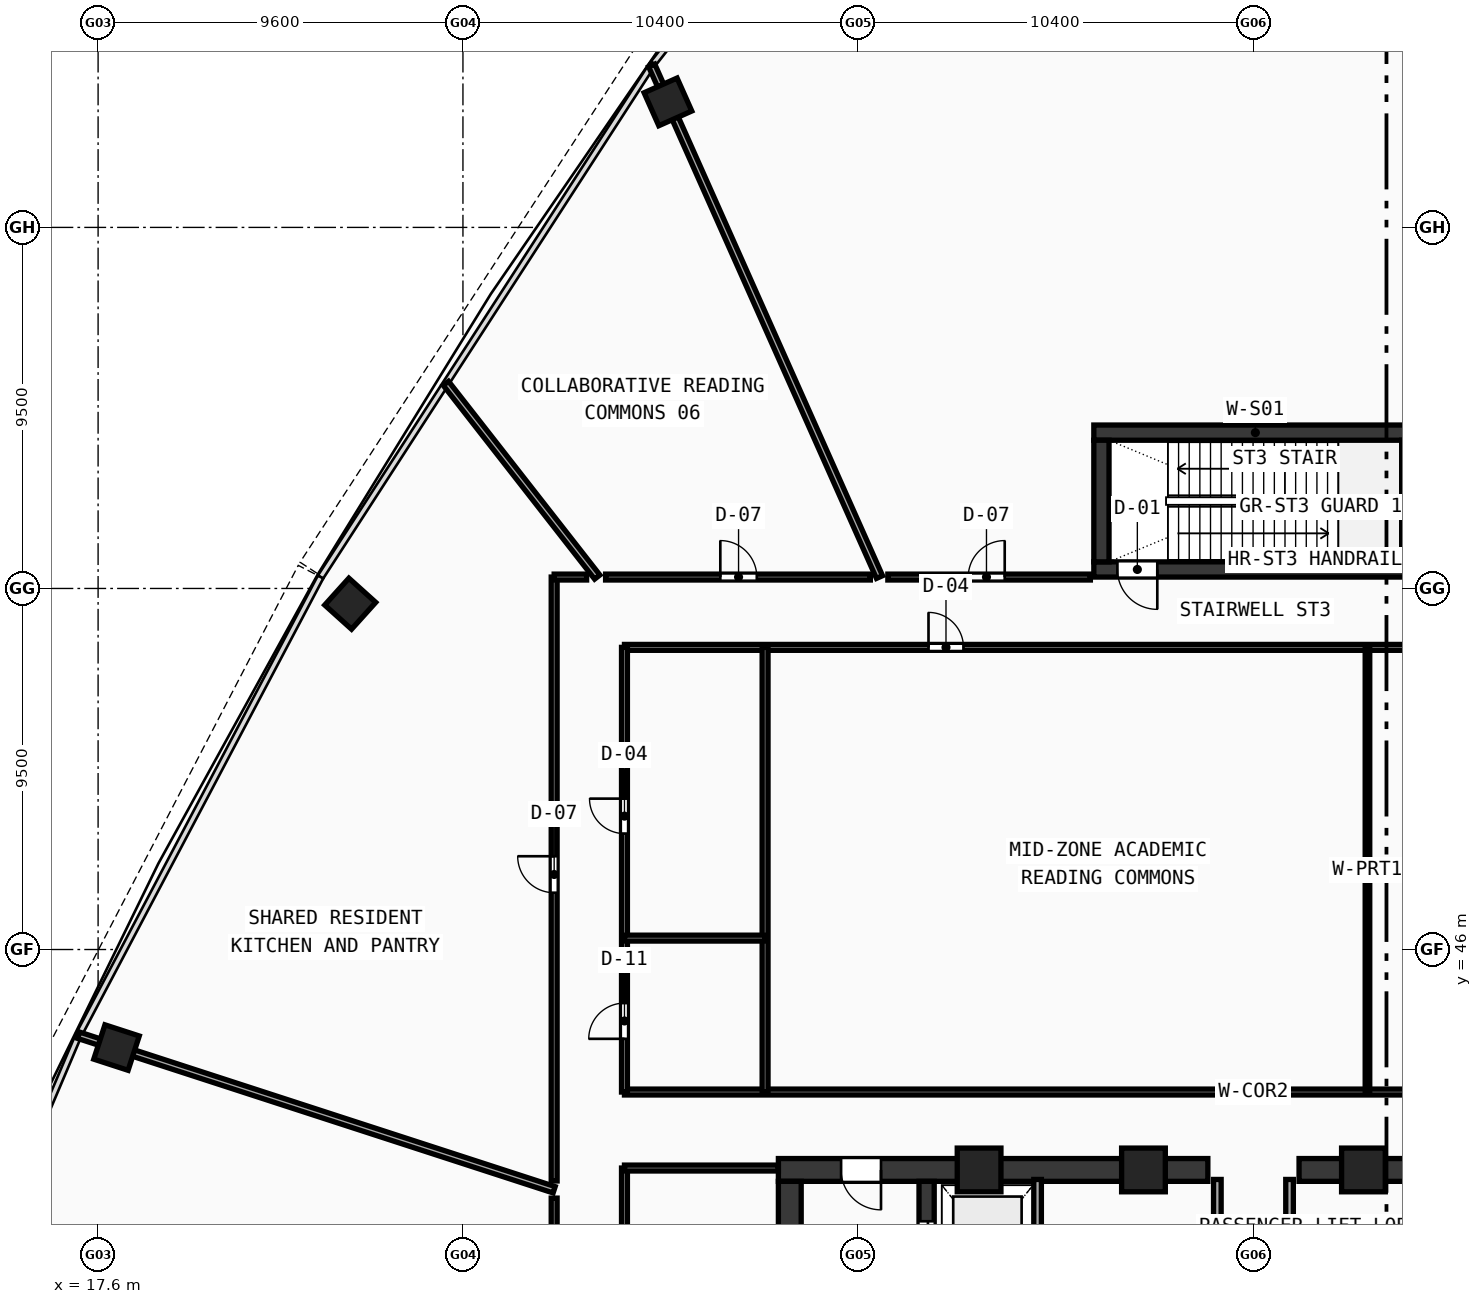
"""IFC4 building model, lengths in metres.
Left out: names, types, materials, properties, quantities, classifications, styles, units other than length and angle.
Written with IfcOpenShell. Run it as: python <this file> out.ifc"""

import sys

from ifc_helpers import new_model, si_unit, direction, frame, frame_2d, origin, origin_with_axes, origin_2d, place, context, subcontext, project, spatial, rectangle, hollow_rectangle, extrude, source, transform, mapped, element, fill, save


model = new_model("IFC4")
c1 = context("Model", 3, precision=1e-05, world=origin(), true_north=direction((0.0, 1.0)))
c2 = subcontext(c1, "Body", "Model", "MODEL_VIEW")
j1 = project(units=[si_unit("LENGTHUNIT", "METRE"), si_unit("PLANEANGLEUNIT", "RADIAN")], contexts=[c1])
p1 = place(None, origin())
s1 = spatial("IfcSite", under=j1, at=p1, CompositionType="ELEMENT")
p2 = place(p1, origin())
s2 = spatial("IfcBuilding", under=s1, at=p2, CompositionType="ELEMENT")
p3 = place(p2, frame((0.0, 0.0, 170.31)))
s3 = spatial("IfcBuildingStorey", under=s2, at=p3, CompositionType="ELEMENT", Elevation=170.31)
p4 = place(p3, frame((35.5, 40.2, 0.0), z_axis=(0.0, 0.0, 1.0), x_axis=(1.0, 0.0, 0.0)))
e1 = element("IfcWall", 1, at=p4, inside=s3, PredefinedType="SHEAR", context=c2, shape_type="SweptSolid", body=[
    extrude(rectangle(XDim=11.3, YDim=0.6, at=frame_2d((5.65, 0.0))), origin(), (0.0, 0.0, 1.0), 5.57),
])
p5 = place(p4, frame((1.65, 0.0, 0.0)))
e2 = element("IfcOpeningElement", 2, at=p5, cuts=e1, PredefinedType="OPENING", context=c2, shape_type="SweptSolid", body=[
    extrude(rectangle(XDim=1.05, YDim=2.1, at=frame_2d((0.525, 1.05))), frame((0.0, 0.31, 0.0), z_axis=(0.0, -1.0, 0.0), x_axis=(1.0, 0.0, 0.0)), (0.0, 0.0, 1.0), 0.62),
])
p6 = place(p3, frame((49.2, 40.2, 0.0), z_axis=(0.0, 0.0, 1.0), x_axis=(1.0, 0.0, 0.0)))
e3 = element("IfcWall", 3, at=p6, inside=s3, PredefinedType="SHEAR", context=c2, shape_type="SweptSolid", body=[
    extrude(rectangle(XDim=11.3, YDim=0.6, at=frame_2d((5.65, 0.0))), origin(), (0.0, 0.0, 1.0), 5.57),
])
p7 = place(p6, frame((8.6, 0.0, 0.0)))
e4 = element("IfcOpeningElement", 4, at=p7, cuts=e3, PredefinedType="OPENING", context=c2, shape_type="SweptSolid", body=[
    extrude(rectangle(XDim=1.05, YDim=2.1, at=frame_2d((0.525, 1.05))), frame((0.0, 0.31, 0.0), z_axis=(0.0, -1.0, 0.0), x_axis=(1.0, 0.0, 0.0)), (0.0, 0.0, 1.0), 0.62),
])
p8 = place(p3, frame((35.8, 27.8, 0.0), z_axis=(0.0, 0.0, 1.0), x_axis=(0.0, 1.0, 0.0)))
e5 = element("IfcWall", 5, at=p8, inside=s3, PredefinedType="SHEAR", context=c2, shape_type="SweptSolid", body=[
    extrude(rectangle(XDim=12.1, YDim=0.6, at=frame_2d((6.05, 0.0))), origin(), (0.0, 0.0, 1.0), 5.57),
])
p9 = place(p3, frame((39.4, 27.8, 0.0), z_axis=(0.0, 0.0, 1.0), x_axis=(0.0, 1.0, 0.0)))
e6 = element("IfcWall", 6, at=p9, inside=s3, PredefinedType="SHEAR", context=c2, shape_type="SweptSolid", body=[
    extrude(rectangle(XDim=12.1, YDim=0.4, at=frame_2d((6.05, 0.0))), origin(), (0.0, 0.0, 1.0), 5.57),
])
p10 = place(p9, frame((9.95, 0.0, 0.0)))
e7 = element("IfcOpeningElement", 7, at=p10, cuts=e6, PredefinedType="OPENING", context=c2, shape_type="SweptSolid", body=[
    extrude(rectangle(XDim=1.1, YDim=2.1, at=frame_2d((0.55, 1.05))), frame((0.0, 0.21, 0.0), z_axis=(0.0, -1.0, 0.0), x_axis=(1.0, 0.0, 0.0)), (0.0, 0.0, 1.0), 0.42),
])
p11 = place(p3, frame((43.8, 59.6, 0.0), z_axis=(0.0, 0.0, 1.0), x_axis=(1.0, 0.0, 0.0)))
e8 = element("IfcWall", 8, at=p11, inside=s3, PredefinedType="SHEAR", context=c2, shape_type="SweptSolid", body=[
    extrude(rectangle(XDim=8.5, YDim=0.4, at=frame_2d((4.25, 0.0))), origin(), (0.0, 0.0, 1.0), 5.57),
])
p12 = place(p3, frame((43.8, 56.0, 0.0), z_axis=(0.0, 0.0, 1.0), x_axis=(1.0, 0.0, 0.0)))
e9 = element("IfcWall", 9, at=p12, inside=s3, PredefinedType="SHEAR", context=c2, shape_type="SweptSolid", body=[
    extrude(rectangle(XDim=8.5, YDim=0.4, at=frame_2d((4.25, 0.0))), origin(), (0.0, 0.0, 1.0), 5.57),
])
p13 = place(p12, frame((0.62, 0.0, 0.0)))
e10 = element("IfcOpeningElement", 10, at=p13, cuts=e9, PredefinedType="OPENING", context=c2, shape_type="SweptSolid", body=[
    extrude(rectangle(XDim=1.05, YDim=2.1, at=frame_2d((0.525, 1.05))), frame((0.0, 0.21, 0.0), z_axis=(0.0, -1.0, 0.0), x_axis=(1.0, 0.0, 0.0)), (0.0, 0.0, 1.0), 0.42),
])
for number, where, z_axis, x_axis in (
    (11, (44.0, 56.2, 0.0), (0.0, 0.0, 1.0), (0.0, 1.0, 0.0)),
    (12, (52.1, 56.2, 0.0), (0.0, 0.0, 1.0), (0.0, 1.0, 0.0)),
):
    element("IfcWall", number, at=place(p3, frame(where, z_axis=z_axis, x_axis=x_axis)), inside=s3, PredefinedType="SHEAR", context=c2, shape_type="SweptSolid", body=[
        extrude(rectangle(XDim=3.2, YDim=0.4, at=frame_2d((1.6, 0.0))), origin(), (0.0, 0.0, 1.0), 5.57),
    ])
m1 = source(origin(), c2, "Body", "SweptSolid", [
    extrude(hollow_rectangle(XDim=1.15, YDim=1.15, WallThickness=0.048, at=origin_2d()), origin(), (0.0, 0.0, 1.0), 5.83),
])
for number, where, z_axis, x_axis in (
    (13, (50.894, 40.2, -0.26), (0.0, 0.0, 1.0), (1.0, 0.0, 0.0)),
    (14, (45.106, 40.2, -0.26), (0.0, 0.0, 1.0), (1.0, 0.0, 0.0)),
    (15, (40.781, 40.2, -0.26), (0.0, 0.0, 1.0), (1.0, 0.0, 0.0)),
):
    element("IfcColumn", number, at=place(p3, frame(where, z_axis=z_axis, x_axis=x_axis)), inside=s3, PredefinedType="COLUMN", context=c2, shape_type="MappedRepresentation", body=[
        mapped(m1, transform((0.0, 0.0, 0.0), scale=1.0)),
    ])
m2 = source(origin(), c2, "Body", "SweptSolid", [
    extrude(hollow_rectangle(XDim=0.95, YDim=0.95, WallThickness=0.04, at=origin_2d()), origin(), (0.0, 0.0, 1.0), 5.83),
])
for number, where, z_axis, x_axis in (
    (16, (32.594, 68.303, -0.26), (0.0, 0.0, 1.0), (-0.914, -0.407, 0.0)),
    (17, (24.234, 55.099, -0.26), (0.0, 0.0, 1.0), (-0.669, -0.743, 0.0)),
    (18, (18.085, 43.42, -0.26), (0.0, 0.0, 1.0), (-0.309, -0.951, 0.0)),
):
    element("IfcColumn", number, at=place(p3, frame(where, z_axis=z_axis, x_axis=x_axis)), inside=s3, PredefinedType="COLUMN", context=c2, shape_type="MappedRepresentation", body=[
        mapped(m2, transform((0.0, 0.0, 0.0), scale=1.0)),
    ])
p14 = place(p3, frame((42.32, 33.5, 0.0), z_axis=(0.0, 0.0, 1.0), x_axis=(0.0, 1.0, 0.0)))
e19 = element("IfcWall", 19, at=p14, inside=s3, PredefinedType="SOLIDWALL", context=c2, shape_type="SweptSolid", body=[
    extrude(rectangle(XDim=6.45, YDim=0.2, at=frame_2d((3.225, 0.0))), origin(), (0.0, 0.0, 1.0), 5.57),
])
p15 = place(p14, frame((1.0, 0.0, 0.0)))
e20 = element("IfcOpeningElement", 20, at=p15, cuts=e19, PredefinedType="OPENING", context=c2, shape_type="SweptSolid", body=[
    extrude(rectangle(XDim=1.05, YDim=2.1, at=frame_2d((0.525, 1.05))), frame((0.0, 0.11, 0.0), z_axis=(0.0, -1.0, 0.0), x_axis=(1.0, 0.0, 0.0)), (0.0, 0.0, 1.0), 0.22),
])
for number, where, z_axis, x_axis in (
    (21, (47.05, 37.32, 0.0), (0.0, 0.0, 1.0), (0.0, 1.0, 0.0)),
    (22, (48.95, 37.32, 0.0), (0.0, 0.0, 1.0), (0.0, 1.0, 0.0)),
):
    element("IfcWall", number, at=place(p3, frame(where, z_axis=z_axis, x_axis=x_axis)), inside=s3, PredefinedType="SOLIDWALL", context=c2, shape_type="SweptSolid", body=[
        extrude(rectangle(XDim=2.63, YDim=0.2, at=frame_2d((1.315, 0.0))), origin(), (0.0, 0.0, 1.0), 5.57),
    ])
p16 = place(p3, frame((31.45, 42.25, 0.0), z_axis=(0.0, 0.0, 1.0), x_axis=(1.0, 0.0, 0.0)))
e23 = element("IfcWall", 23, at=p16, inside=s3, PredefinedType="PARTITIONING", context=c2, shape_type="SweptSolid", body=[
    extrude(rectangle(XDim=33.1, YDim=0.155, at=frame_2d((16.55, 0.0))), origin(), (0.0, 0.0, 1.0), 2.22),
])
p17 = place(p3, frame((31.45, 53.95, 0.0), z_axis=(0.0, 0.0, 1.0), x_axis=(1.0, 0.0, 0.0)))
e24 = element("IfcWall", 24, at=p17, inside=s3, PredefinedType="PARTITIONING", context=c2, shape_type="SweptSolid", body=[
    extrude(rectangle(XDim=33.1, YDim=0.155, at=frame_2d((16.55, 0.0))), origin(), (0.0, 0.0, 1.0), 2.22),
])
p18 = place(p17, frame((8.0, 0.0, 0.0)))
e25 = element("IfcOpeningElement", 25, at=p18, cuts=e24, PredefinedType="OPENING", context=c2, shape_type="SweptSolid", body=[
    extrude(rectangle(XDim=0.92, YDim=2.1, at=frame_2d((0.46, 1.05))), frame((0.0, 0.087, 0.0), z_axis=(0.0, -1.0, 0.0), x_axis=(1.0, 0.0, 0.0)), (0.0, 0.0, 1.0), 0.175),
])
p19 = place(p17, frame((24.05, 0.0, 0.0)))
e26 = element("IfcOpeningElement", 26, at=p19, cuts=e24, PredefinedType="OPENING", context=c2, shape_type="SweptSolid", body=[
    extrude(rectangle(XDim=0.92, YDim=2.1, at=frame_2d((0.46, 1.05))), frame((0.0, 0.087, 0.0), z_axis=(0.0, -1.0, 0.0), x_axis=(1.0, 0.0, 0.0)), (0.0, 0.0, 1.0), 0.175),
])
p20 = place(p3, frame((31.45, 42.25, 0.0), z_axis=(0.0, 0.0, 1.0), x_axis=(0.0, 1.0, 0.0)))
e27 = element("IfcWall", 27, at=p20, inside=s3, PredefinedType="PARTITIONING", context=c2, shape_type="SweptSolid", body=[
    extrude(rectangle(XDim=11.7, YDim=0.155, at=frame_2d((5.85, 0.0))), origin(), (0.0, 0.0, 1.0), 2.22),
])
p21 = place(p20, frame((1.4, 0.0, 0.0)))
e28 = element("IfcOpeningElement", 28, at=p21, cuts=e27, PredefinedType="OPENING", context=c2, shape_type="SweptSolid", body=[
    extrude(rectangle(XDim=0.94, YDim=2.1, at=frame_2d((0.47, 1.05))), frame((0.0, 0.087, 0.0), z_axis=(0.0, -1.0, 0.0), x_axis=(1.0, 0.0, 0.0)), (0.0, 0.0, 1.0), 0.175),
])
p22 = place(p20, frame((6.8, 0.0, 0.0)))
e29 = element("IfcOpeningElement", 29, at=p22, cuts=e27, PredefinedType="OPENING", context=c2, shape_type="SweptSolid", body=[
    extrude(rectangle(XDim=0.92, YDim=2.1, at=frame_2d((0.46, 1.05))), frame((0.0, 0.087, 0.0), z_axis=(0.0, -1.0, 0.0), x_axis=(1.0, 0.0, 0.0)), (0.0, 0.0, 1.0), 0.175),
])
p23 = place(p3, frame((35.15, 42.25, 0.0), z_axis=(0.0, 0.0, 1.0), x_axis=(0.0, 1.0, 0.0)))
e30 = element("IfcWall", 30, at=p23, inside=s3, PredefinedType="PARTITIONING", context=c2, shape_type="SweptSolid", body=[
    extrude(rectangle(XDim=11.7, YDim=0.155, at=frame_2d((5.85, 0.0))), origin(), (0.0, 0.0, 1.0), 2.22),
])
p24 = place(p3, frame((31.45, 46.3, 0.0), z_axis=(0.0, 0.0, 1.0), x_axis=(1.0, 0.0, 0.0)))
e31 = element("IfcWall", 31, at=p24, inside=s3, PredefinedType="PARTITIONING", context=c2, shape_type="SweptSolid", body=[
    extrude(rectangle(XDim=3.7, YDim=0.155, at=frame_2d((1.85, 0.0))), origin(), (0.0, 0.0, 1.0), 2.22),
])
p25 = place(p3, frame((51.0, 42.25, 0.0), z_axis=(0.0, 0.0, 1.0), x_axis=(0.0, 1.0, 0.0)))
e32 = element("IfcWall", 32, at=p25, inside=s3, PredefinedType="PARTITIONING", context=c2, shape_type="SweptSolid", body=[
    extrude(rectangle(XDim=11.7, YDim=0.12, at=frame_2d((5.85, 0.0))), origin(), (0.0, 0.0, 1.0), 5.17),
])
p26 = place(p3, frame((31.45, 23.65, 0.0), z_axis=(0.0, 0.0, 1.0), x_axis=(0.0, 1.0, 0.0)))
e33 = element("IfcWall", 33, at=p26, inside=s3, PredefinedType="PARTITIONING", context=c2, shape_type="SweptSolid", body=[
    extrude(rectangle(XDim=16.6, YDim=0.155, at=frame_2d((8.3, 0.0))), origin(), (0.0, 0.0, 1.0), 2.22),
])
p27 = place(p26, frame((7.5, 0.0, 0.0)))
e34 = element("IfcOpeningElement", 34, at=p27, cuts=e33, PredefinedType="OPENING", context=c2, shape_type="SweptSolid", body=[
    extrude(rectangle(XDim=0.9, YDim=2.08, at=frame_2d((0.45, 1.04))), frame((0.0, 0.087, 0.0), z_axis=(0.0, -1.0, 0.0), x_axis=(1.0, 0.0, 0.0)), (0.0, 0.0, 1.0), 0.175),
])
p28 = place(p3, frame((31.45, 40.25, 0.0), z_axis=(0.0, 0.0, 1.0), x_axis=(1.0, 0.0, 0.0)))
e35 = element("IfcWall", 35, at=p28, inside=s3, PredefinedType="PARTITIONING", context=c2, shape_type="SweptSolid", body=[
    extrude(rectangle(XDim=4.05, YDim=0.155, at=frame_2d((2.025, 0.0))), origin(), (0.0, 0.0, 1.0), 5.57),
])
p29 = place(p3, frame((38.16, 55.8, 0.0), z_axis=(0.0, 0.0, 1.0), x_axis=(-0.406737891531, 0.913544901793, 0.0)))
e36 = element("IfcWall", 36, at=p29, inside=s3, PredefinedType="PARTITIONING", context=c2, shape_type="SweptSolid", body=[
    extrude(rectangle(XDim=14.736, YDim=0.175, at=frame_2d((7.368, 0.0))), origin(), (0.0, 0.0, 1.0), 2.22),
])
p30 = place(p3, frame((30.734, 55.8, 0.0), z_axis=(0.0, 0.0, 1.0), x_axis=(-0.615677005502, 0.787998619857, 0.0)))
e37 = element("IfcWall", 37, at=p30, inside=s3, PredefinedType="PARTITIONING", context=c2, shape_type="SweptSolid", body=[
    extrude(rectangle(XDim=6.468, YDim=0.175, at=frame_2d((3.234, 0.0))), origin(), (0.0, 0.0, 1.0), 4.92),
])
p31 = place(p3, frame((29.6, 39.678, 0.0), z_axis=(0.0, 0.0, 1.0), x_axis=(-0.951058745875, 0.309010132349, 0.0)))
e38 = element("IfcWall", 38, at=p31, inside=s3, PredefinedType="PARTITIONING", context=c2, shape_type="SweptSolid", body=[
    extrude(rectangle(XDim=13.158, YDim=0.175, at=frame_2d((6.579, 0.0))), origin(), (0.0, 0.0, 1.0), 2.22),
])
p32 = place(p3, frame((29.6, 30.675, 0.0), z_axis=(0.0, 0.0, 1.0), x_axis=(0.0, 1.0, 0.0)))
e39 = element("IfcWall", 39, at=p32, inside=s3, PredefinedType="PARTITIONING", context=c2, shape_type="SweptSolid", body=[
    extrude(rectangle(XDim=8.783, YDim=0.155, at=frame_2d((4.392, 0.0))), origin(), (0.0, 0.0, 1.0), 2.22),
])
p33 = place(p32, frame((3.917, 0.0, 0.0)))
e40 = element("IfcOpeningElement", 40, at=p33, cuts=e39, PredefinedType="OPENING", context=c2, shape_type="SweptSolid", body=[
    extrude(rectangle(XDim=0.96, YDim=2.12, at=frame_2d((0.48, 1.06))), frame((0.0, 0.087, 0.0), z_axis=(0.0, -1.0, 0.0), x_axis=(1.0, 0.0, 0.0)), (0.0, 0.0, 1.0), 0.175),
])
p34 = place(p3, frame((29.6, 39.91, 0.0), z_axis=(0.0, 0.0, 1.0), x_axis=(0.0, 1.0, 0.0)))
e41 = element("IfcWall", 41, at=p34, inside=s3, PredefinedType="PARTITIONING", context=c2, shape_type="SweptSolid", body=[
    extrude(rectangle(XDim=15.89, YDim=0.155, at=frame_2d((7.945, 0.0))), origin(), (0.0, 0.0, 1.0), 2.22),
])
p35 = place(p34, frame((7.584, 0.0, 0.0)))
e42 = element("IfcOpeningElement", 42, at=p35, cuts=e41, PredefinedType="OPENING", context=c2, shape_type="SweptSolid", body=[
    extrude(rectangle(XDim=0.96, YDim=2.12, at=frame_2d((0.48, 1.06))), frame((0.0, 0.087, 0.0), z_axis=(0.0, -1.0, 0.0), x_axis=(1.0, 0.0, 0.0)), (0.0, 0.0, 1.0), 0.175),
])
p36 = place(p3, frame((29.6, 55.8, 0.0), z_axis=(0.0, 0.0, 1.0), x_axis=(1.0, 0.0, 0.0)))
e43 = element("IfcWall", 43, at=p36, inside=s3, PredefinedType="PARTITIONING", context=c2, shape_type="SweptSolid", body=[
    extrude(rectangle(XDim=0.854, YDim=0.155, at=frame_2d((0.427, 0.0))), origin(), (0.0, 0.0, 1.0), 5.57),
])
p37 = place(p3, frame((30.953, 55.8, 0.0), z_axis=(0.0, 0.0, 1.0), x_axis=(1.0, 0.0, 0.0)))
e44 = element("IfcWall", 44, at=p37, inside=s3, PredefinedType="PARTITIONING", context=c2, shape_type="SweptSolid", body=[
    extrude(rectangle(XDim=6.966, YDim=0.155, at=frame_2d((3.483, 0.0))), origin(), (0.0, 0.0, 1.0), 2.22),
])
p38 = place(p37, frame((3.019, 0.0, 0.0)))
e45 = element("IfcOpeningElement", 45, at=p38, cuts=e44, PredefinedType="OPENING", context=c2, shape_type="SweptSolid", body=[
    extrude(rectangle(XDim=0.96, YDim=2.12, at=frame_2d((0.48, 1.06))), frame((0.0, 0.087, 0.0), z_axis=(0.0, -1.0, 0.0), x_axis=(1.0, 0.0, 0.0)), (0.0, 0.0, 1.0), 0.175),
])
p39 = place(p3, frame((38.38, 55.8, 0.0), z_axis=(0.0, 0.0, 1.0), x_axis=(1.0, 0.0, 0.0)))
e46 = element("IfcWall", 46, at=p39, inside=s3, PredefinedType="PARTITIONING", context=c2, shape_type="SweptSolid", body=[
    extrude(rectangle(XDim=5.329, YDim=0.155, at=frame_2d((2.665, 0.0))), origin(), (0.0, 0.0, 1.0), 2.22),
])
p40 = place(p39, frame((2.115, 0.0, 0.0)))
e47 = element("IfcOpeningElement", 47, at=p40, cuts=e46, PredefinedType="OPENING", context=c2, shape_type="SweptSolid", body=[
    extrude(rectangle(XDim=0.96, YDim=2.12, at=frame_2d((0.48, 1.06))), frame((0.0, 0.087, 0.0), z_axis=(0.0, -1.0, 0.0), x_axis=(1.0, 0.0, 0.0)), (0.0, 0.0, 1.0), 0.175),
])
m3 = source(origin(), c2, "Body", "SweptSolid", [
    extrude(rectangle(XDim=1.05, YDim=2.1, at=frame_2d((0.525, 1.05))), frame((0.0, 0.025, 0.0), z_axis=(0.0, -1.0, 0.0), x_axis=(1.0, 0.0, 0.0)), (0.0, 0.0, 1.0), 0.05),
])
p41 = place(p5, frame((1.05, 0.0, 0.0), z_axis=(0.0, 0.0, 1.0), x_axis=(-1.0, 0.0, 0.0)))
e48 = element("IfcDoor", 48, at=p41, inside=s3, OperationType="SINGLE_SWING_LEFT", PredefinedType="DOOR", context=c2, shape_type="MappedRepresentation", body=[
    mapped(m3, transform((0.0, 0.0, 0.0), scale=1.0)),
])
fill(e2, e48)
m4 = source(origin(), c2, "Body", "SweptSolid", [
    extrude(rectangle(XDim=1.1, YDim=2.1, at=frame_2d((0.55, 1.05))), frame((0.0, 0.025, 0.0), z_axis=(0.0, -1.0, 0.0), x_axis=(1.0, 0.0, 0.0)), (0.0, 0.0, 1.0), 0.05),
])
p42 = place(p10, frame((1.1, 0.0, 0.0), z_axis=(0.0, 0.0, 1.0), x_axis=(-1.0, 0.0, 0.0)))
e49 = element("IfcDoor", 49, at=p42, inside=s3, OperationType="DOUBLE_DOOR_SLIDING", PredefinedType="DOOR", context=c2, shape_type="MappedRepresentation", body=[
    mapped(m4, transform((0.0, 0.0, 0.0), scale=1.0)),
])
fill(e7, e49)
p43 = place(p13, frame((1.05, 0.0, 0.0), z_axis=(0.0, 0.0, 1.0), x_axis=(-1.0, 0.0, 0.0)))
e50 = element("IfcDoor", 50, at=p43, inside=s3, OperationType="SINGLE_SWING_LEFT", PredefinedType="DOOR", context=c2, shape_type="MappedRepresentation", body=[
    mapped(m3, transform((0.0, 0.0, 0.0), scale=1.0)),
])
fill(e10, e50)
m5 = source(origin(), c2, "Body", "SweptSolid", [
    extrude(rectangle(XDim=0.94, YDim=2.1, at=frame_2d((0.47, 1.05))), frame((0.0, 0.025, 0.0), z_axis=(0.0, -1.0, 0.0), x_axis=(1.0, 0.0, 0.0)), (0.0, 0.0, 1.0), 0.05),
])
p44 = place(p21, origin_with_axes())
e51 = element("IfcDoor", 51, at=p44, inside=s3, OperationType="SINGLE_SWING_LEFT", PredefinedType="DOOR", context=c2, shape_type="MappedRepresentation", body=[
    mapped(m5, transform((0.0, 0.0, 0.0), scale=1.0)),
])
fill(e28, e51)
m6 = source(origin(), c2, "Body", "SweptSolid", [
    extrude(rectangle(XDim=0.92, YDim=2.1, at=frame_2d((0.46, 1.05))), frame((0.0, 0.025, 0.0), z_axis=(0.0, -1.0, 0.0), x_axis=(1.0, 0.0, 0.0)), (0.0, 0.0, 1.0), 0.05),
])
p45 = place(p22, origin_with_axes())
e52 = element("IfcDoor", 52, at=p45, inside=s3, OperationType="SINGLE_SWING_RIGHT", PredefinedType="DOOR", context=c2, shape_type="MappedRepresentation", body=[
    mapped(m6, transform((0.0, 0.0, 0.0), scale=1.0)),
])
fill(e29, e52)
p46 = place(p18, origin_with_axes())
e53 = element("IfcDoor", 53, at=p46, inside=s3, OperationType="SINGLE_SWING_LEFT", PredefinedType="DOOR", context=c2, shape_type="MappedRepresentation", body=[
    mapped(m6, transform((0.0, 0.0, 0.0), scale=1.0)),
])
fill(e25, e53)
m7 = source(origin(), c2, "Body", "SweptSolid", [
    extrude(rectangle(XDim=0.96, YDim=2.12, at=frame_2d((0.48, 1.06))), frame((0.0, 0.025, 0.0), z_axis=(0.0, -1.0, 0.0), x_axis=(1.0, 0.0, 0.0)), (0.0, 0.0, 1.0), 0.05),
])
p47 = place(p40, origin_with_axes())
e54 = element("IfcDoor", 54, at=p47, inside=s3, OperationType="SINGLE_SWING_RIGHT", PredefinedType="DOOR", context=c2, shape_type="MappedRepresentation", body=[
    mapped(m7, transform((0.0, 0.0, 0.0), scale=1.0)),
])
fill(e47, e54)
p48 = place(p38, origin_with_axes())
e55 = element("IfcDoor", 55, at=p48, inside=s3, OperationType="SINGLE_SWING_LEFT", PredefinedType="DOOR", context=c2, shape_type="MappedRepresentation", body=[
    mapped(m7, transform((0.0, 0.0, 0.0), scale=1.0)),
])
fill(e45, e55)
p49 = place(p35, origin_with_axes())
e56 = element("IfcDoor", 56, at=p49, inside=s3, OperationType="SINGLE_SWING_RIGHT", PredefinedType="DOOR", context=c2, shape_type="MappedRepresentation", body=[
    mapped(m7, transform((0.0, 0.0, 0.0), scale=1.0)),
])
fill(e42, e56)
save(model, sys.argv[1])
